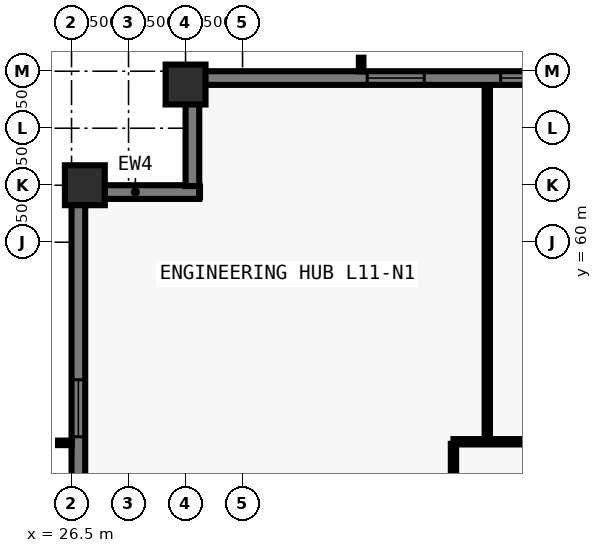
"""IFC4 building model, lengths in metres.
Left out: names, types, materials, properties, quantities, classifications, styles, units other than length and angle.
Written with IfcOpenShell. Run it as: python <this file> out.ifc"""

import sys

from ifc_helpers import new_model, si_unit, direction, frame, frame_2d, origin, origin_2d, place, context, subcontext, project, spatial, rectangle, extrude, element, fill, save


model = new_model("IFC4")
c1 = context("Model", 3, precision=1e-05, world=origin(), true_north=direction((0.0, 1.0)))
c2 = subcontext(c1, "Body", "Model", "MODEL_VIEW")
j1 = project(units=[si_unit("LENGTHUNIT", "METRE"), si_unit("PLANEANGLEUNIT", "RADIAN")], contexts=[c1])
p1 = place(None, origin())
s1 = spatial("IfcSite", under=j1, at=p1, CompositionType="ELEMENT")
p2 = place(p1, origin())
s2 = spatial("IfcBuilding", under=s1, at=p2, CompositionType="ELEMENT")
p3 = place(p2, frame((0.0, 0.0, 44.5)))
s3 = spatial("IfcBuildingStorey", under=s2, at=p3, CompositionType="ELEMENT", Elevation=44.5)
for number, where, z_axis, x_axis in (
    (1, (29.5, 64.15, 0.0), (0.0, 0.0, 1.0), (1.0, 0.0, 0.0)),
    (2, (26.85, 61.5, 0.0), (0.0, 0.0, 1.0), (0.0, 1.0, 0.0)),
):
    element("IfcColumn", number, at=place(p3, frame(where, z_axis=z_axis, x_axis=x_axis)), inside=s3, PredefinedType="COLUMN", context=c2, shape_type="SweptSolid", body=[
        extrude(rectangle(XDim=1.05, YDim=1.05, at=origin_2d()), origin(), (0.0, 0.0, 1.0), 3.5),
    ])
p4 = place(p3, frame((26.68, 16.5, 0.0), z_axis=(0.0, 0.0, 1.0), x_axis=(0.0, 1.0, 0.0)))
e3 = element("IfcWall", 3, at=p4, inside=s3, PredefinedType="SOLIDWALL", context=c2, shape_type="SweptSolid", body=[
    extrude(rectangle(XDim=44.662, YDim=0.36, at=frame_2d((22.331, 0.0))), origin(), (0.0, 0.0, 1.0), 3.28),
])
p5 = place(p4, frame((4.78, 0.0, 0.8)))
e4 = element("IfcOpeningElement", 4, at=p5, cuts=e3, PredefinedType="OPENING", context=c2, shape_type="SweptSolid", body=[
    extrude(rectangle(XDim=1.5, YDim=1.544, at=frame_2d((0.75, 0.772))), frame((0.0, 0.19, 0.0), z_axis=(0.0, -1.0, 0.0), x_axis=(1.0, 0.0, 0.0)), (0.0, 0.0, 1.0), 0.38),
])
p6 = place(p4, frame((8.29, 0.0, 0.8)))
e5 = element("IfcOpeningElement", 5, at=p6, cuts=e3, PredefinedType="OPENING", context=c2, shape_type="SweptSolid", body=[
    extrude(rectangle(XDim=1.2, YDim=1.544, at=frame_2d((0.6, 0.772))), frame((0.0, 0.19, 0.0), z_axis=(0.0, -1.0, 0.0), x_axis=(1.0, 0.0, 0.0)), (0.0, 0.0, 1.0), 0.38),
])
p7 = place(p4, frame((11.5, 0.0, 0.8)))
e6 = element("IfcOpeningElement", 6, at=p7, cuts=e3, PredefinedType="OPENING", context=c2, shape_type="SweptSolid", body=[
    extrude(rectangle(XDim=1.5, YDim=1.544, at=frame_2d((0.75, 0.772))), frame((0.0, 0.19, 0.0), z_axis=(0.0, -1.0, 0.0), x_axis=(1.0, 0.0, 0.0)), (0.0, 0.0, 1.0), 0.38),
])
p8 = place(p4, frame((15.01, 0.0, 0.8)))
e7 = element("IfcOpeningElement", 7, at=p8, cuts=e3, PredefinedType="OPENING", context=c2, shape_type="SweptSolid", body=[
    extrude(rectangle(XDim=1.2, YDim=1.544, at=frame_2d((0.6, 0.772))), frame((0.0, 0.19, 0.0), z_axis=(0.0, -1.0, 0.0), x_axis=(1.0, 0.0, 0.0)), (0.0, 0.0, 1.0), 0.38),
])
p9 = place(p4, frame((18.671, 0.0, 0.8)))
e8 = element("IfcOpeningElement", 8, at=p9, cuts=e3, PredefinedType="OPENING", context=c2, shape_type="SweptSolid", body=[
    extrude(rectangle(XDim=1.5, YDim=1.544, at=frame_2d((0.75, 0.772))), frame((0.0, 0.19, 0.0), z_axis=(0.0, -1.0, 0.0), x_axis=(1.0, 0.0, 0.0)), (0.0, 0.0, 1.0), 0.38),
])
p10 = place(p4, frame((20.881, 0.0, 0.8)))
e9 = element("IfcOpeningElement", 9, at=p10, cuts=e3, PredefinedType="OPENING", context=c2, shape_type="SweptSolid", body=[
    extrude(rectangle(XDim=1.2, YDim=1.544, at=frame_2d((0.6, 0.772))), frame((0.0, 0.19, 0.0), z_axis=(0.0, -1.0, 0.0), x_axis=(1.0, 0.0, 0.0)), (0.0, 0.0, 1.0), 0.38),
])
p11 = place(p4, frame((24.941, 0.0, 0.8)))
e10 = element("IfcOpeningElement", 10, at=p11, cuts=e3, PredefinedType="OPENING", context=c2, shape_type="SweptSolid", body=[
    extrude(rectangle(XDim=1.5, YDim=1.544, at=frame_2d((0.75, 0.772))), frame((0.0, 0.19, 0.0), z_axis=(0.0, -1.0, 0.0), x_axis=(1.0, 0.0, 0.0)), (0.0, 0.0, 1.0), 0.38),
])
p12 = place(p4, frame((28.451, 0.0, 0.8)))
e11 = element("IfcOpeningElement", 11, at=p12, cuts=e3, PredefinedType="OPENING", context=c2, shape_type="SweptSolid", body=[
    extrude(rectangle(XDim=1.2, YDim=1.544, at=frame_2d((0.6, 0.772))), frame((0.0, 0.19, 0.0), z_axis=(0.0, -1.0, 0.0), x_axis=(1.0, 0.0, 0.0)), (0.0, 0.0, 1.0), 0.38),
])
p13 = place(p4, frame((31.662, 0.0, 0.8)))
e12 = element("IfcOpeningElement", 12, at=p13, cuts=e3, PredefinedType="OPENING", context=c2, shape_type="SweptSolid", body=[
    extrude(rectangle(XDim=1.5, YDim=1.544, at=frame_2d((0.75, 0.772))), frame((0.0, 0.19, 0.0), z_axis=(0.0, -1.0, 0.0), x_axis=(1.0, 0.0, 0.0)), (0.0, 0.0, 1.0), 0.38),
])
p14 = place(p4, frame((35.172, 0.0, 0.8)))
e13 = element("IfcOpeningElement", 13, at=p14, cuts=e3, PredefinedType="OPENING", context=c2, shape_type="SweptSolid", body=[
    extrude(rectangle(XDim=1.2, YDim=1.544, at=frame_2d((0.6, 0.772))), frame((0.0, 0.19, 0.0), z_axis=(0.0, -1.0, 0.0), x_axis=(1.0, 0.0, 0.0)), (0.0, 0.0, 1.0), 0.38),
])
p15 = place(p4, frame((38.382, 0.0, 0.8)))
e14 = element("IfcOpeningElement", 14, at=p15, cuts=e3, PredefinedType="OPENING", context=c2, shape_type="SweptSolid", body=[
    extrude(rectangle(XDim=1.5, YDim=1.544, at=frame_2d((0.75, 0.772))), frame((0.0, 0.19, 0.0), z_axis=(0.0, -1.0, 0.0), x_axis=(1.0, 0.0, 0.0)), (0.0, 0.0, 1.0), 0.38),
])
p16 = place(p3, frame((26.5, 61.32, 0.0), z_axis=(0.0, 0.0, 1.0), x_axis=(1.0, 0.0, 0.0)))
e15 = element("IfcWall", 15, at=p16, inside=s3, PredefinedType="SOLIDWALL", context=c2, shape_type="SweptSolid", body=[
    extrude(rectangle(XDim=3.36, YDim=0.36, at=frame_2d((1.68, 0.0))), origin(), (0.0, 0.0, 1.0), 3.28),
])
p17 = place(p3, frame((29.68, 61.478, 0.0), z_axis=(0.0, 0.0, 1.0), x_axis=(0.0, 1.0, 0.0)))
e16 = element("IfcWall", 16, at=p17, inside=s3, PredefinedType="SOLIDWALL", context=c2, shape_type="SweptSolid", body=[
    extrude(rectangle(XDim=2.684, YDim=0.36, at=frame_2d((1.342, 0.0))), origin(), (0.0, 0.0, 1.0), 3.28),
])
p18 = place(p3, frame((29.5, 64.32, 0.0), z_axis=(0.0, 0.0, 1.0), x_axis=(1.0, 0.0, 0.0)))
e17 = element("IfcWall", 17, at=p18, inside=s3, PredefinedType="SOLIDWALL", context=c2, shape_type="SweptSolid", body=[
    extrude(rectangle(XDim=44.662, YDim=0.36, at=frame_2d((22.331, 0.0))), origin(), (0.0, 0.0, 1.0), 3.28),
])
p19 = place(p18, frame((4.78, 0.0, 0.8)))
e18 = element("IfcOpeningElement", 18, at=p19, cuts=e17, PredefinedType="OPENING", context=c2, shape_type="SweptSolid", body=[
    extrude(rectangle(XDim=1.5, YDim=1.544, at=frame_2d((0.75, 0.772))), frame((0.0, 0.19, 0.0), z_axis=(0.0, -1.0, 0.0), x_axis=(1.0, 0.0, 0.0)), (0.0, 0.0, 1.0), 0.38),
])
p20 = place(p18, frame((8.29, 0.0, 0.8)))
e19 = element("IfcOpeningElement", 19, at=p20, cuts=e17, PredefinedType="OPENING", context=c2, shape_type="SweptSolid", body=[
    extrude(rectangle(XDim=1.2, YDim=1.544, at=frame_2d((0.6, 0.772))), frame((0.0, 0.19, 0.0), z_axis=(0.0, -1.0, 0.0), x_axis=(1.0, 0.0, 0.0)), (0.0, 0.0, 1.0), 0.38),
])
p21 = place(p18, frame((11.5, 0.0, 0.8)))
e20 = element("IfcOpeningElement", 20, at=p21, cuts=e17, PredefinedType="OPENING", context=c2, shape_type="SweptSolid", body=[
    extrude(rectangle(XDim=1.5, YDim=1.544, at=frame_2d((0.75, 0.772))), frame((0.0, 0.19, 0.0), z_axis=(0.0, -1.0, 0.0), x_axis=(1.0, 0.0, 0.0)), (0.0, 0.0, 1.0), 0.38),
])
p22 = place(p18, frame((15.01, 0.0, 0.8)))
e21 = element("IfcOpeningElement", 21, at=p22, cuts=e17, PredefinedType="OPENING", context=c2, shape_type="SweptSolid", body=[
    extrude(rectangle(XDim=1.2, YDim=1.544, at=frame_2d((0.6, 0.772))), frame((0.0, 0.19, 0.0), z_axis=(0.0, -1.0, 0.0), x_axis=(1.0, 0.0, 0.0)), (0.0, 0.0, 1.0), 0.38),
])
p23 = place(p18, frame((18.671, 0.0, 0.8)))
e22 = element("IfcOpeningElement", 22, at=p23, cuts=e17, PredefinedType="OPENING", context=c2, shape_type="SweptSolid", body=[
    extrude(rectangle(XDim=1.5, YDim=1.544, at=frame_2d((0.75, 0.772))), frame((0.0, 0.19, 0.0), z_axis=(0.0, -1.0, 0.0), x_axis=(1.0, 0.0, 0.0)), (0.0, 0.0, 1.0), 0.38),
])
p24 = place(p18, frame((21.731, 0.0, 0.8)))
e23 = element("IfcOpeningElement", 23, at=p24, cuts=e17, PredefinedType="OPENING", context=c2, shape_type="SweptSolid", body=[
    extrude(rectangle(XDim=1.2, YDim=1.544, at=frame_2d((0.6, 0.772))), frame((0.0, 0.19, 0.0), z_axis=(0.0, -1.0, 0.0), x_axis=(1.0, 0.0, 0.0)), (0.0, 0.0, 1.0), 0.38),
])
p25 = place(p18, frame((24.941, 0.0, 0.8)))
e24 = element("IfcOpeningElement", 24, at=p25, cuts=e17, PredefinedType="OPENING", context=c2, shape_type="SweptSolid", body=[
    extrude(rectangle(XDim=1.5, YDim=1.544, at=frame_2d((0.75, 0.772))), frame((0.0, 0.19, 0.0), z_axis=(0.0, -1.0, 0.0), x_axis=(1.0, 0.0, 0.0)), (0.0, 0.0, 1.0), 0.38),
])
p26 = place(p18, frame((28.451, 0.0, 0.8)))
e25 = element("IfcOpeningElement", 25, at=p26, cuts=e17, PredefinedType="OPENING", context=c2, shape_type="SweptSolid", body=[
    extrude(rectangle(XDim=1.2, YDim=1.544, at=frame_2d((0.6, 0.772))), frame((0.0, 0.19, 0.0), z_axis=(0.0, -1.0, 0.0), x_axis=(1.0, 0.0, 0.0)), (0.0, 0.0, 1.0), 0.38),
])
p27 = place(p18, frame((31.662, 0.0, 0.8)))
e26 = element("IfcOpeningElement", 26, at=p27, cuts=e17, PredefinedType="OPENING", context=c2, shape_type="SweptSolid", body=[
    extrude(rectangle(XDim=1.5, YDim=1.544, at=frame_2d((0.75, 0.772))), frame((0.0, 0.19, 0.0), z_axis=(0.0, -1.0, 0.0), x_axis=(1.0, 0.0, 0.0)), (0.0, 0.0, 1.0), 0.38),
])
p28 = place(p18, frame((35.172, 0.0, 0.8)))
e27 = element("IfcOpeningElement", 27, at=p28, cuts=e17, PredefinedType="OPENING", context=c2, shape_type="SweptSolid", body=[
    extrude(rectangle(XDim=1.2, YDim=1.544, at=frame_2d((0.6, 0.772))), frame((0.0, 0.19, 0.0), z_axis=(0.0, -1.0, 0.0), x_axis=(1.0, 0.0, 0.0)), (0.0, 0.0, 1.0), 0.38),
])
p29 = place(p18, frame((38.382, 0.0, 0.8)))
e28 = element("IfcOpeningElement", 28, at=p29, cuts=e17, PredefinedType="OPENING", context=c2, shape_type="SweptSolid", body=[
    extrude(rectangle(XDim=1.5, YDim=1.544, at=frame_2d((0.75, 0.772))), frame((0.0, 0.19, 0.0), z_axis=(0.0, -1.0, 0.0), x_axis=(1.0, 0.0, 0.0)), (0.0, 0.0, 1.0), 0.38),
])
p30 = place(p3, frame((36.55, 54.75, 0.0), z_axis=(0.0, 0.0, 1.0), x_axis=(1.0, 0.0, 0.0)))
e29 = element("IfcWall", 29, at=p30, inside=s3, PredefinedType="PARTITIONING", context=c2, shape_type="SweptSolid", body=[
    extrude(rectangle(XDim=30.9, YDim=0.14, at=frame_2d((15.45, 0.0))), origin(), (0.0, 0.0, 1.0), 3.28),
])
p31 = place(p30, frame((3.69, 0.0, 0.0)))
e30 = element("IfcOpeningElement", 30, at=p31, cuts=e29, PredefinedType="OPENING", context=c2, shape_type="SweptSolid", body=[
    extrude(rectangle(XDim=0.96, YDim=2.12, at=frame_2d((0.48, 1.06))), frame((0.0, 0.08, 0.0), z_axis=(0.0, -1.0, 0.0), x_axis=(1.0, 0.0, 0.0)), (0.0, 0.0, 1.0), 0.16),
])
p32 = place(p30, frame((5.013, 0.0, 0.0)))
e31 = element("IfcOpeningElement", 31, at=p32, cuts=e29, PredefinedType="OPENING", context=c2, shape_type="SweptSolid", body=[
    extrude(rectangle(XDim=0.96, YDim=2.12, at=frame_2d((0.48, 1.06))), frame((0.0, 0.08, 0.0), z_axis=(0.0, -1.0, 0.0), x_axis=(1.0, 0.0, 0.0)), (0.0, 0.0, 1.0), 0.16),
])
p33 = place(p30, frame((15.045, 0.0, 0.0)))
e32 = element("IfcOpeningElement", 32, at=p33, cuts=e29, PredefinedType="OPENING", context=c2, shape_type="SweptSolid", body=[
    extrude(rectangle(XDim=0.96, YDim=2.12, at=frame_2d((0.48, 1.06))), frame((0.0, 0.08, 0.0), z_axis=(0.0, -1.0, 0.0), x_axis=(1.0, 0.0, 0.0)), (0.0, 0.0, 1.0), 0.16),
])
p34 = place(p30, frame((25.077, 0.0, 0.0)))
e33 = element("IfcOpeningElement", 33, at=p34, cuts=e29, PredefinedType="OPENING", context=c2, shape_type="SweptSolid", body=[
    extrude(rectangle(XDim=0.96, YDim=2.12, at=frame_2d((0.48, 1.06))), frame((0.0, 0.08, 0.0), z_axis=(0.0, -1.0, 0.0), x_axis=(1.0, 0.0, 0.0)), (0.0, 0.0, 1.0), 0.16),
])
p35 = place(p30, frame((28.92, 0.0, 0.0)))
e34 = element("IfcOpeningElement", 34, at=p35, cuts=e29, PredefinedType="OPENING", context=c2, shape_type="SweptSolid", body=[
    extrude(rectangle(XDim=0.96, YDim=2.12, at=frame_2d((0.48, 1.06))), frame((0.0, 0.08, 0.0), z_axis=(0.0, -1.0, 0.0), x_axis=(1.0, 0.0, 0.0)), (0.0, 0.0, 1.0), 0.16),
])
p36 = place(p3, frame((36.55, 23.305, 0.0), z_axis=(0.0, 0.0, 1.0), x_axis=(0.0, 1.0, 0.0)))
e35 = element("IfcWall", 35, at=p36, inside=s3, PredefinedType="PARTITIONING", context=c2, shape_type="SweptSolid", body=[
    extrude(rectangle(XDim=31.39, YDim=0.14, at=frame_2d((15.695, 0.0))), origin(), (0.0, 0.0, 1.0), 3.28),
])
p37 = place(p36, frame((3.307, 0.0, 0.0)))
e36 = element("IfcOpeningElement", 36, at=p37, cuts=e35, PredefinedType="OPENING", context=c2, shape_type="SweptSolid", body=[
    extrude(rectangle(XDim=0.96, YDim=2.12, at=frame_2d((0.48, 1.06))), frame((0.0, 0.08, 0.0), z_axis=(0.0, -1.0, 0.0), x_axis=(1.0, 0.0, 0.0)), (0.0, 0.0, 1.0), 0.16),
])
p38 = place(p36, frame((11.25, 0.0, 0.0)))
e37 = element("IfcOpeningElement", 37, at=p38, cuts=e35, PredefinedType="OPENING", context=c2, shape_type="SweptSolid", body=[
    extrude(rectangle(XDim=0.96, YDim=2.12, at=frame_2d((0.48, 1.06))), frame((0.0, 0.08, 0.0), z_axis=(0.0, -1.0, 0.0), x_axis=(1.0, 0.0, 0.0)), (0.0, 0.0, 1.0), 0.16),
])
p39 = place(p36, frame((19.075, 0.0, 0.0)))
e38 = element("IfcOpeningElement", 38, at=p39, cuts=e35, PredefinedType="OPENING", context=c2, shape_type="SweptSolid", body=[
    extrude(rectangle(XDim=0.96, YDim=2.12, at=frame_2d((0.48, 1.06))), frame((0.0, 0.08, 0.0), z_axis=(0.0, -1.0, 0.0), x_axis=(1.0, 0.0, 0.0)), (0.0, 0.0, 1.0), 0.16),
])
p40 = place(p36, frame((26.782, 0.0, 0.0)))
e39 = element("IfcOpeningElement", 39, at=p40, cuts=e35, PredefinedType="OPENING", context=c2, shape_type="SweptSolid", body=[
    extrude(rectangle(XDim=0.96, YDim=2.12, at=frame_2d((0.48, 1.06))), frame((0.0, 0.08, 0.0), z_axis=(0.0, -1.0, 0.0), x_axis=(1.0, 0.0, 0.0)), (0.0, 0.0, 1.0), 0.16),
])
p41 = place(p3, frame((37.439, 54.85, 0.0), z_axis=(0.0, 0.0, 1.0), x_axis=(0.0, 1.0, 0.0)))
e40 = element("IfcWall", 40, at=p41, inside=s3, PredefinedType="PARTITIONING", context=c2, shape_type="SweptSolid", body=[
    extrude(rectangle(XDim=9.23, YDim=0.14, at=frame_2d((4.615, 0.0))), origin(), (0.0, 0.0, 1.0), 3.28),
])
p42 = place(p15, origin())
e41 = element("IfcWindow", 41, at=p42, inside=s3, PartitioningType="SINGLE_PANEL", PredefinedType="WINDOW", context=c2, shape_type="SweptSolid", body=[
    extrude(rectangle(XDim=1.5, YDim=1.544, at=frame_2d((0.75, 0.772))), frame((0.0, -0.05, 0.0), z_axis=(0.0, -1.0, 0.0), x_axis=(1.0, 0.0, 0.0)), (0.0, 0.0, 1.0), 0.06),
])
fill(e14, e41)
p43 = place(p19, origin())
e42 = element("IfcWindow", 42, at=p43, inside=s3, PartitioningType="SINGLE_PANEL", PredefinedType="WINDOW", context=c2, shape_type="SweptSolid", body=[
    extrude(rectangle(XDim=1.5, YDim=1.544, at=frame_2d((0.75, 0.772))), frame((0.0, -0.05, 0.0), z_axis=(0.0, -1.0, 0.0), x_axis=(1.0, 0.0, 0.0)), (0.0, 0.0, 1.0), 0.06),
])
fill(e18, e42)
p44 = place(p20, origin())
e43 = element("IfcWindow", 43, at=p44, inside=s3, PartitioningType="SINGLE_PANEL", PredefinedType="WINDOW", context=c2, shape_type="SweptSolid", body=[
    extrude(rectangle(XDim=1.2, YDim=1.544, at=frame_2d((0.6, 0.772))), frame((0.0, -0.05, 0.0), z_axis=(0.0, -1.0, 0.0), x_axis=(1.0, 0.0, 0.0)), (0.0, 0.0, 1.0), 0.06),
])
fill(e19, e43)
save(model, sys.argv[1])
